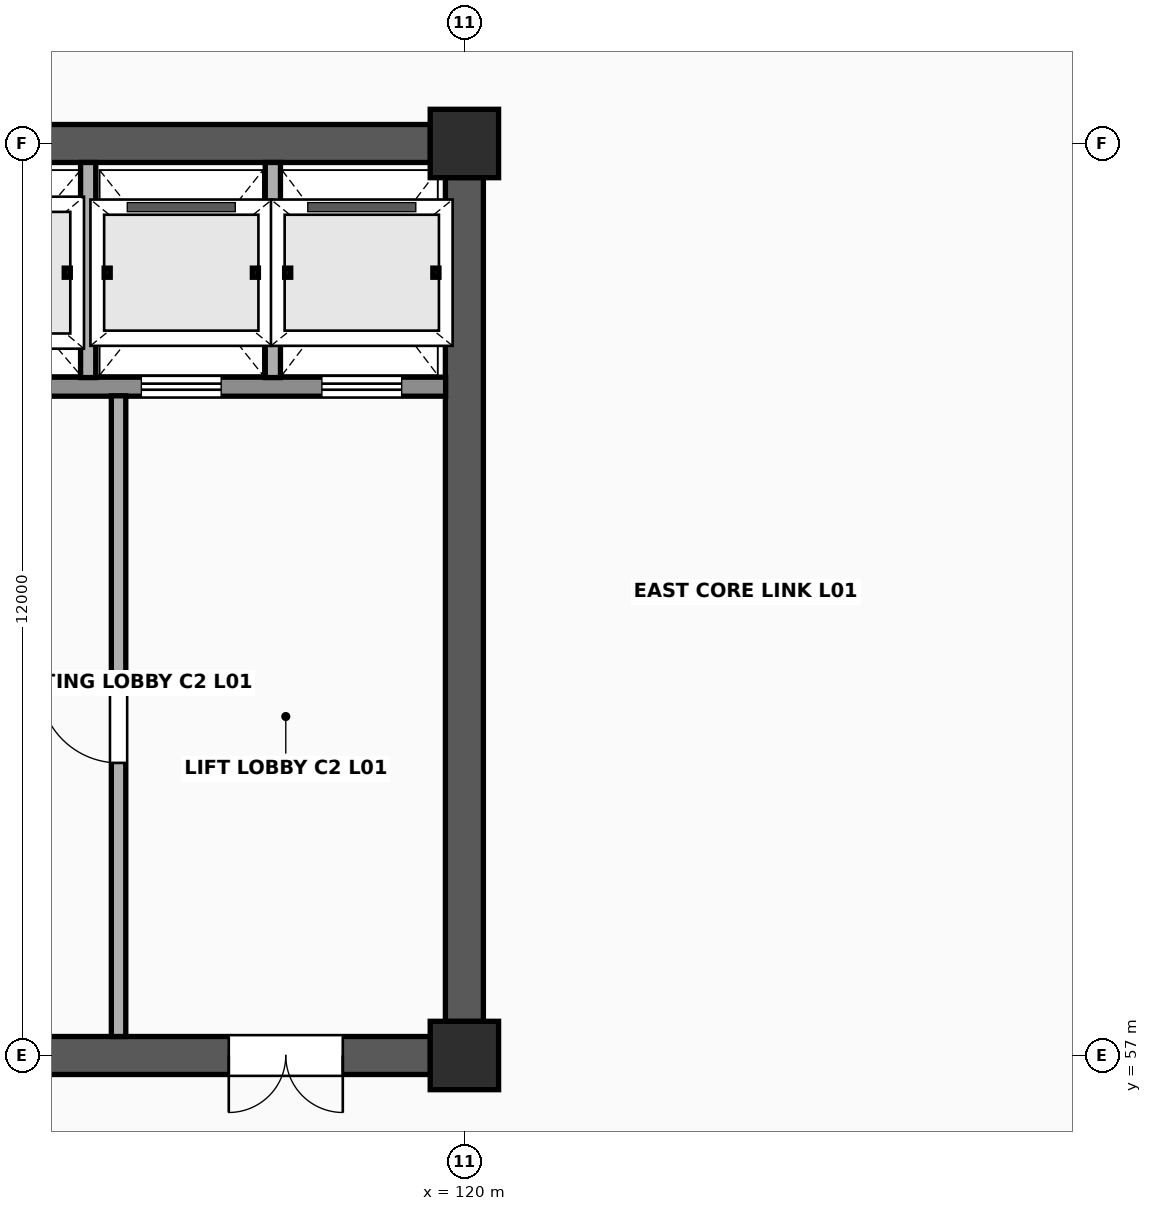
"""IFC4 building model, lengths in metres.
Left out: names, types, materials, properties, quantities, classifications, styles, units other than length and angle.
Written with IfcOpenShell. Run it as: python <this file> out.ifc"""

import sys

from ifc_helpers import new_model, si_unit, direction, frame, frame_2d, origin, origin_2d, place, context, subcontext, project, spatial, rectangle, extrude, element, fill, save


model = new_model("IFC4")
c1 = context("Model", 3, precision=1e-05, world=origin(), true_north=direction((0.0, 1.0)))
c2 = subcontext(c1, "Body", "Model", "MODEL_VIEW")
j1 = project(units=[si_unit("LENGTHUNIT", "METRE"), si_unit("PLANEANGLEUNIT", "RADIAN")], contexts=[c1])
p1 = place(None, origin())
s1 = spatial("IfcSite", under=j1, at=p1, CompositionType="ELEMENT")
p2 = place(p1, origin())
s2 = spatial("IfcBuilding", under=s1, at=p2, CompositionType="ELEMENT")
p3 = place(p2, frame((0.0, 0.0, 5.4)))
s3 = spatial("IfcBuildingStorey", under=s2, at=p3, CompositionType="ELEMENT", Elevation=5.4)
for number, where, z_axis, x_axis in (
    (1, (120.0, 57.0, 0.0), (0.0, 0.0, 1.0), (1.0, 0.0, 0.0)),
    (2, (120.0, 69.0, 0.0), (0.0, 0.0, 1.0), (1.0, 0.0, 0.0)),
):
    element("IfcColumn", number, at=place(p3, frame(where, z_axis=z_axis, x_axis=x_axis)), inside=s3, PredefinedType="COLUMN", context=c2, shape_type="SweptSolid", body=[
        extrude(rectangle(XDim=0.9, YDim=0.9, at=origin_2d()), origin(), (0.0, 0.0, 1.0), 4.2),
    ])
p4 = place(p3, frame((108.447, 57.0, 0.0), z_axis=(0.0, 0.0, 1.0), x_axis=(1.0, 0.0, 0.0)))
e3 = element("IfcWall", 3, at=p4, inside=s3, PredefinedType="SHEAR", context=c2, shape_type="SweptSolid", body=[
    extrude(rectangle(XDim=11.106, YDim=0.5, at=frame_2d((5.553, 0.0))), origin(), (0.0, 0.0, 1.0), 4.043),
])
p5 = place(p4, frame((4.753, 0.0, 0.0)))
e4 = element("IfcOpeningElement", 4, at=p5, cuts=e3, PredefinedType="OPENING", context=c2, shape_type="SweptSolid", body=[
    extrude(rectangle(XDim=1.2, YDim=2.2, at=frame_2d((0.6, 1.1))), frame((0.0, 0.265, 0.0), z_axis=(0.0, -1.0, 0.0), x_axis=(1.0, 0.0, 0.0)), (0.0, 0.0, 1.0), 0.53),
])
p6 = place(p4, frame((8.453, 0.0, 0.0)))
e5 = element("IfcOpeningElement", 5, at=p6, cuts=e3, PredefinedType="OPENING", context=c2, shape_type="SweptSolid", body=[
    extrude(rectangle(XDim=1.5, YDim=2.25, at=frame_2d((0.75, 1.125))), frame((0.0, 0.265, 0.0), z_axis=(0.0, -1.0, 0.0), x_axis=(1.0, 0.0, 0.0)), (0.0, 0.0, 1.0), 0.53),
])
for number, where, z_axis, x_axis in (
    (6, (108.447, 69.0, 0.0), (0.0, 0.0, 1.0), (1.0, 0.0, 0.0)),
    (7, (120.0, 57.447, 0.0), (0.0, 0.0, 1.0), (0.0, 1.0, 0.0)),
):
    element("IfcWall", number, at=place(p3, frame(where, z_axis=z_axis, x_axis=x_axis)), inside=s3, PredefinedType="SHEAR", context=c2, shape_type="SweptSolid", body=[
        extrude(rectangle(XDim=11.106, YDim=0.5, at=frame_2d((5.553, 0.0))), origin(), (0.0, 0.0, 1.0), 4.043),
    ])
p7 = place(p3, frame((112.597, 65.8, 0.0), z_axis=(0.0, 0.0, 1.0), x_axis=(1.0, 0.0, 0.0)))
e8 = element("IfcWall", 8, at=p7, inside=s3, PredefinedType="SOLIDWALL", context=c2, shape_type="SweptSolid", body=[
    extrude(rectangle(XDim=7.156, YDim=0.25, at=frame_2d((3.578, 0.0))), origin(), (0.0, 0.0, 1.0), 4.043),
])
p8 = place(p7, frame((0.653, 0.0, 0.0)))
e9 = element("IfcOpeningElement", 9, at=p8, cuts=e8, PredefinedType="OPENING", context=c2, shape_type="SweptSolid", body=[
    extrude(rectangle(XDim=1.1, YDim=2.24, at=frame_2d((0.55, 1.12))), frame((0.0, 0.14, 0.0), z_axis=(0.0, -1.0, 0.0), x_axis=(1.0, 0.0, 0.0)), (0.0, 0.0, 1.0), 0.28),
])
p9 = place(p7, frame((3.153, 0.0, 0.0)))
e10 = element("IfcOpeningElement", 10, at=p9, cuts=e8, PredefinedType="OPENING", context=c2, shape_type="SweptSolid", body=[
    extrude(rectangle(XDim=1.05, YDim=2.2, at=frame_2d((0.525, 1.1))), frame((0.0, 0.14, 0.0), z_axis=(0.0, -1.0, 0.0), x_axis=(1.0, 0.0, 0.0)), (0.0, 0.0, 1.0), 0.28),
])
p10 = place(p7, frame((5.528, 0.0, 0.0)))
e11 = element("IfcOpeningElement", 11, at=p10, cuts=e8, PredefinedType="OPENING", context=c2, shape_type="SweptSolid", body=[
    extrude(rectangle(XDim=1.05, YDim=2.2, at=frame_2d((0.525, 1.1))), frame((0.0, 0.14, 0.0), z_axis=(0.0, -1.0, 0.0), x_axis=(1.0, 0.0, 0.0)), (0.0, 0.0, 1.0), 0.28),
])
for number, where, z_axis, x_axis in (
    (12, (115.05, 65.92, 0.0), (0.0, 0.0, 1.0), (0.0, 1.0, 0.0)),
    (13, (117.48, 65.92, 0.0), (0.0, 0.0, 1.0), (0.0, 1.0, 0.0)),
):
    element("IfcWall", number, at=place(p3, frame(where, z_axis=z_axis, x_axis=x_axis)), inside=s3, PredefinedType="SOLIDWALL", context=c2, shape_type="SweptSolid", body=[
        extrude(rectangle(XDim=2.83, YDim=0.2, at=frame_2d((1.415, 0.0))), origin(), (0.0, 0.0, 1.0), 4.033),
    ])
p11 = place(p3, frame((115.45, 57.25, 0.0), z_axis=(0.0, 0.0, 1.0), x_axis=(0.0, 1.0, 0.0)))
e14 = element("IfcWall", 14, at=p11, inside=s3, PredefinedType="SOLIDWALL", context=c2, shape_type="SweptSolid", body=[
    extrude(rectangle(XDim=8.43, YDim=0.19, at=frame_2d((4.215, 0.0))), origin(), (0.0, 0.0, 1.0), 4.033),
])
p12 = place(p11, frame((3.6, 0.0, 0.0)))
e15 = element("IfcOpeningElement", 15, at=p12, cuts=e14, PredefinedType="OPENING", context=c2, shape_type="SweptSolid", body=[
    extrude(rectangle(XDim=1.04, YDim=2.18, at=frame_2d((0.52, 1.09))), frame((0.0, 0.11, 0.0), z_axis=(0.0, -1.0, 0.0), x_axis=(1.0, 0.0, 0.0)), (0.0, 0.0, 1.0), 0.22),
])
p13 = place(p12, origin())
e16 = element("IfcDoor", 16, at=p13, inside=s3, OperationType="SINGLE_SWING_RIGHT", PredefinedType="DOOR", context=c2, shape_type="SweptSolid", body=[
    extrude(rectangle(XDim=1.04, YDim=2.18, at=frame_2d((0.52, 1.09))), frame((0.0, 0.025, 0.0), z_axis=(0.0, -1.0, 0.0), x_axis=(1.0, 0.0, 0.0)), (0.0, 0.0, 1.0), 0.05),
])
fill(e15, e16)
p14 = place(p6, origin())
e17 = element("IfcDoor", 17, at=p14, inside=s3, OperationType="DOUBLE_DOOR_SINGLE_SWING", PredefinedType="DOOR", context=c2, shape_type="SweptSolid", body=[
    extrude(rectangle(XDim=1.5, YDim=2.25, at=frame_2d((0.75, 1.125))), frame((0.0, 0.025, 0.0), z_axis=(0.0, -1.0, 0.0), x_axis=(1.0, 0.0, 0.0)), (0.0, 0.0, 1.0), 0.05),
])
fill(e5, e17)
p15 = place(p9, origin())
e18 = element("IfcDoor", 18, at=p15, inside=s3, OperationType="SLIDING_TO_LEFT", PredefinedType="USERDEFINED", context=c2, shape_type="SweptSolid", body=[
    extrude(rectangle(XDim=1.05, YDim=2.2, at=frame_2d((0.525, 1.1))), frame((0.0, 0.025, 0.0), z_axis=(0.0, -1.0, 0.0), x_axis=(1.0, 0.0, 0.0)), (0.0, 0.0, 1.0), 0.05),
])
fill(e10, e18)
p16 = place(p10, origin())
e19 = element("IfcDoor", 19, at=p16, inside=s3, OperationType="SLIDING_TO_LEFT", PredefinedType="USERDEFINED", context=c2, shape_type="SweptSolid", body=[
    extrude(rectangle(XDim=1.05, YDim=2.2, at=frame_2d((0.525, 1.1))), frame((0.0, 0.025, 0.0), z_axis=(0.0, -1.0, 0.0), x_axis=(1.0, 0.0, 0.0)), (0.0, 0.0, 1.0), 0.05),
])
fill(e11, e19)
save(model, sys.argv[1])
